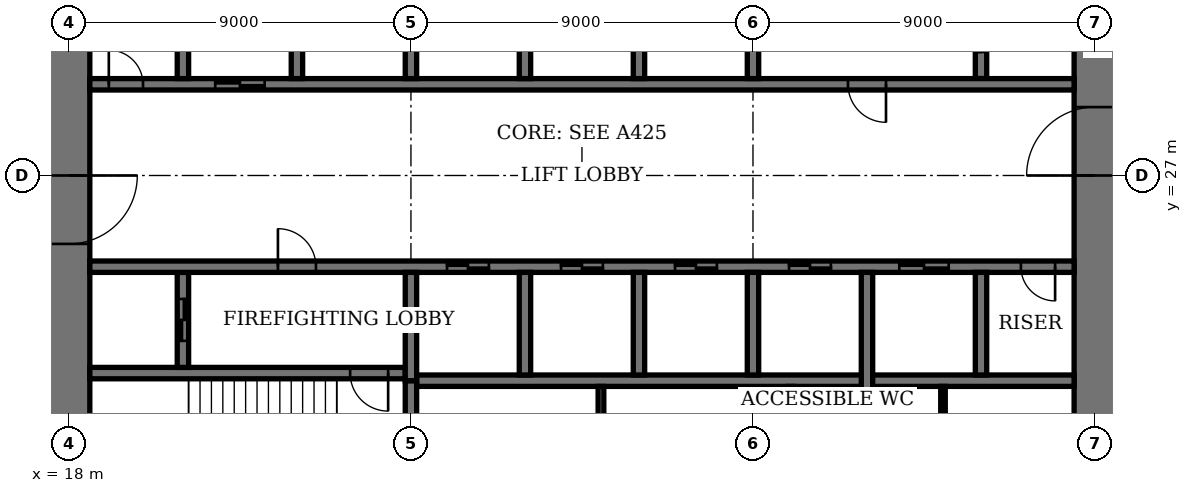
"""IFC4 building model, lengths in metres.
Left out: names, types, materials, properties, quantities, classifications, styles, units other than length and angle.
Written with IfcOpenShell. Run it as: python <this file> out.ifc"""

import sys

from ifc_helpers import new_model, si_unit, direction, frame, frame_2d, origin, place, context, subcontext, project, spatial, rectangle, extrude, element, fill, save


model = new_model("IFC4")
c1 = context("Model", 3, precision=1e-05, world=origin(), true_north=direction((0.0, 1.0)))
c2 = subcontext(c1, "Body", "Model", "MODEL_VIEW")
j1 = project(units=[si_unit("LENGTHUNIT", "METRE"), si_unit("PLANEANGLEUNIT", "RADIAN")], contexts=[c1])
p1 = place(None, origin())
s1 = spatial("IfcSite", under=j1, at=p1, CompositionType="ELEMENT")
p2 = place(p1, origin())
s2 = spatial("IfcBuilding", under=s1, at=p2, CompositionType="ELEMENT")
p3 = place(p2, frame((0.0, 0.0, 55.8)))
s3 = spatial("IfcBuildingStorey", under=s2, at=p3, CompositionType="ELEMENT", Elevation=55.8)
p4 = place(p3, frame((18.0, 35.45, 0.0), z_axis=(0.0, 0.0, 1.0), x_axis=(0.0, -1.0, 0.0)))
e1 = element("IfcWall", 1, at=p4, inside=s3, PredefinedType="SHEAR", context=c2, shape_type="SweptSolid", body=[
    extrude(rectangle(XDim=16.9, YDim=1.1, at=frame_2d((8.45, 0.0))), origin(), (0.0, 0.0, 1.0), 4.0),
])
p5 = place(p4, frame((8.45, 0.0, 0.0)))
e2 = element("IfcOpeningElement", 2, at=p5, cuts=e1, PredefinedType="OPENING", context=c2, shape_type="SweptSolid", body=[
    extrude(rectangle(XDim=1.8, YDim=2.4, at=frame_2d((0.9, 1.2))), frame((0.0, 0.56, 0.0), z_axis=(0.0, -1.0, 0.0), x_axis=(1.0, 0.0, 0.0)), (0.0, 0.0, 1.0), 1.12),
])
p6 = place(p3, frame((45.0, 18.55, 0.0), z_axis=(0.0, 0.0, 1.0), x_axis=(0.0, 1.0, 0.0)))
e3 = element("IfcWall", 3, at=p6, inside=s3, PredefinedType="SHEAR", context=c2, shape_type="SweptSolid", body=[
    extrude(rectangle(XDim=16.9, YDim=1.1, at=frame_2d((8.45, 0.0))), origin(), (0.0, 0.0, 1.0), 4.0),
])
p7 = place(p6, frame((8.45, 0.0, 0.0)))
e4 = element("IfcOpeningElement", 4, at=p7, cuts=e3, PredefinedType="OPENING", context=c2, shape_type="SweptSolid", body=[
    extrude(rectangle(XDim=1.8, YDim=2.4, at=frame_2d((0.9, 1.2))), frame((0.0, 0.56, 0.0), z_axis=(0.0, -1.0, 0.0), x_axis=(1.0, 0.0, 0.0)), (0.0, 0.0, 1.0), 1.12),
])
p8 = place(p3, frame((18.55, 21.8, 0.0), z_axis=(0.0, 0.0, 1.0), x_axis=(1.0, 0.0, 0.0)))
e5 = element("IfcWall", 5, at=p8, inside=s3, PredefinedType="SHEAR", context=c2, shape_type="SweptSolid", body=[
    extrude(rectangle(XDim=8.3, YDim=0.3, at=frame_2d((4.15, 0.0))), origin(), (0.0, 0.0, 1.0), 4.0),
])
p9 = place(p8, frame((6.85, 0.0, 0.0)))
e6 = element("IfcOpeningElement", 6, at=p9, cuts=e5, PredefinedType="OPENING", context=c2, shape_type="SweptSolid", body=[
    extrude(rectangle(XDim=1.0, YDim=2.4, at=frame_2d((0.5, 1.2))), frame((0.0, 0.16, 0.0), z_axis=(0.0, -1.0, 0.0), x_axis=(1.0, 0.0, 0.0)), (0.0, 0.0, 1.0), 0.32),
])
p10 = place(p3, frame((27.0, 18.55, 0.0), z_axis=(0.0, 0.0, 1.0), x_axis=(0.0, 1.0, 0.0)))
e7 = element("IfcWall", 7, at=p10, inside=s3, PredefinedType="SHEAR", context=c2, shape_type="SweptSolid", body=[
    extrude(rectangle(XDim=3.05, YDim=0.3, at=frame_2d((1.525, 0.0))), origin(), (0.0, 0.0, 1.0), 4.0),
])
p11 = place(p3, frame((21.0, 21.95, 0.0), z_axis=(0.0, 0.0, 1.0), x_axis=(0.0, 1.0, 0.0)))
e8 = element("IfcWall", 8, at=p11, inside=s3, PredefinedType="SHEAR", context=c2, shape_type="SweptSolid", body=[
    extrude(rectangle(XDim=2.5, YDim=0.3, at=frame_2d((1.25, 0.0))), origin(), (0.0, 0.0, 1.0), 4.0),
])
p12 = place(p11, frame((0.7, 0.0, 0.0)))
e9 = element("IfcOpeningElement", 9, at=p12, cuts=e8, PredefinedType="OPENING", context=c2, shape_type="SweptSolid", body=[
    extrude(rectangle(XDim=1.1, YDim=2.4, at=frame_2d((0.55, 1.2))), frame((0.0, 0.16, 0.0), z_axis=(0.0, -1.0, 0.0), x_axis=(1.0, 0.0, 0.0)), (0.0, 0.0, 1.0), 0.32),
])
p13 = place(p3, frame((42.0, 29.55, 0.0), z_axis=(0.0, 0.0, 1.0), x_axis=(0.0, 1.0, 0.0)))
e10 = element("IfcWall", 10, at=p13, inside=s3, PredefinedType="SHEAR", context=c2, shape_type="SweptSolid", body=[
    extrude(rectangle(XDim=2.5, YDim=0.3, at=frame_2d((1.25, 0.0))), origin(), (0.0, 0.0, 1.0), 4.0),
])
p14 = place(p13, frame((0.7, 0.0, 0.0)))
e11 = element("IfcOpeningElement", 11, at=p14, cuts=e10, PredefinedType="OPENING", context=c2, shape_type="SweptSolid", body=[
    extrude(rectangle(XDim=1.1, YDim=2.4, at=frame_2d((0.55, 1.2))), frame((0.0, 0.16, 0.0), z_axis=(0.0, -1.0, 0.0), x_axis=(1.0, 0.0, 0.0)), (0.0, 0.0, 1.0), 0.32),
])
p15 = place(p3, frame((18.55, 24.6, 0.0), z_axis=(0.0, 0.0, 1.0), x_axis=(1.0, 0.0, 0.0)))
e12 = element("IfcWall", 12, at=p15, inside=s3, PredefinedType="SHEAR", context=c2, shape_type="SweptSolid", body=[
    extrude(rectangle(XDim=25.9, YDim=0.3, at=frame_2d((12.95, 0.0))), origin(), (0.0, 0.0, 1.0), 4.0),
])
p16 = place(p15, frame((4.95, 0.0, 0.0)))
e13 = element("IfcOpeningElement", 13, at=p16, cuts=e12, PredefinedType="OPENING", context=c2, shape_type="SweptSolid", body=[
    extrude(rectangle(XDim=1.0, YDim=2.4, at=frame_2d((0.5, 1.2))), frame((0.0, 0.16, 0.0), z_axis=(0.0, -1.0, 0.0), x_axis=(1.0, 0.0, 0.0)), (0.0, 0.0, 1.0), 0.32),
])
p17 = place(p15, frame((24.5, 0.0, 0.0)))
e14 = element("IfcOpeningElement", 14, at=p17, cuts=e12, PredefinedType="OPENING", context=c2, shape_type="SweptSolid", body=[
    extrude(rectangle(XDim=0.9, YDim=2.1, at=frame_2d((0.45, 1.05))), frame((0.0, 0.16, 0.0), z_axis=(0.0, -1.0, 0.0), x_axis=(1.0, 0.0, 0.0)), (0.0, 0.0, 1.0), 0.32),
])
p18 = place(p15, frame((9.4, 0.0, 0.0)))
e15 = element("IfcOpeningElement", 15, at=p18, cuts=e12, PredefinedType="OPENING", context=c2, shape_type="SweptSolid", body=[
    extrude(rectangle(XDim=1.1, YDim=2.4, at=frame_2d((0.55, 1.2))), frame((0.0, 0.16, 0.0), z_axis=(0.0, -1.0, 0.0), x_axis=(1.0, 0.0, 0.0)), (0.0, 0.0, 1.0), 0.32),
])
p19 = place(p15, frame((12.4, 0.0, 0.0)))
e16 = element("IfcOpeningElement", 16, at=p19, cuts=e12, PredefinedType="OPENING", context=c2, shape_type="SweptSolid", body=[
    extrude(rectangle(XDim=1.1, YDim=2.4, at=frame_2d((0.55, 1.2))), frame((0.0, 0.16, 0.0), z_axis=(0.0, -1.0, 0.0), x_axis=(1.0, 0.0, 0.0)), (0.0, 0.0, 1.0), 0.32),
])
p20 = place(p15, frame((15.4, 0.0, 0.0)))
e17 = element("IfcOpeningElement", 17, at=p20, cuts=e12, PredefinedType="OPENING", context=c2, shape_type="SweptSolid", body=[
    extrude(rectangle(XDim=1.1, YDim=2.4, at=frame_2d((0.55, 1.2))), frame((0.0, 0.16, 0.0), z_axis=(0.0, -1.0, 0.0), x_axis=(1.0, 0.0, 0.0)), (0.0, 0.0, 1.0), 0.32),
])
p21 = place(p15, frame((18.4, 0.0, 0.0)))
e18 = element("IfcOpeningElement", 18, at=p21, cuts=e12, PredefinedType="OPENING", context=c2, shape_type="SweptSolid", body=[
    extrude(rectangle(XDim=1.1, YDim=2.4, at=frame_2d((0.55, 1.2))), frame((0.0, 0.16, 0.0), z_axis=(0.0, -1.0, 0.0), x_axis=(1.0, 0.0, 0.0)), (0.0, 0.0, 1.0), 0.32),
])
p22 = place(p15, frame((21.3, 0.0, 0.0)))
e19 = element("IfcOpeningElement", 19, at=p22, cuts=e12, PredefinedType="OPENING", context=c2, shape_type="SweptSolid", body=[
    extrude(rectangle(XDim=1.3, YDim=2.4, at=frame_2d((0.65, 1.2))), frame((0.0, 0.16, 0.0), z_axis=(0.0, -1.0, 0.0), x_axis=(1.0, 0.0, 0.0)), (0.0, 0.0, 1.0), 0.32),
])
p23 = place(p3, frame((18.55, 29.4, 0.0), z_axis=(0.0, 0.0, 1.0), x_axis=(1.0, 0.0, 0.0)))
e20 = element("IfcWall", 20, at=p23, inside=s3, PredefinedType="SHEAR", context=c2, shape_type="SweptSolid", body=[
    extrude(rectangle(XDim=25.9, YDim=0.3, at=frame_2d((12.95, 0.0))), origin(), (0.0, 0.0, 1.0), 4.0),
])
p24 = place(p23, frame((19.95, 0.0, 0.0)))
e21 = element("IfcOpeningElement", 21, at=p24, cuts=e20, PredefinedType="OPENING", context=c2, shape_type="SweptSolid", body=[
    extrude(rectangle(XDim=1.0, YDim=2.4, at=frame_2d((0.5, 1.2))), frame((0.0, 0.16, 0.0), z_axis=(0.0, -1.0, 0.0), x_axis=(1.0, 0.0, 0.0)), (0.0, 0.0, 1.0), 0.32),
])
p25 = place(p23, frame((0.5, 0.0, 0.0)))
e22 = element("IfcOpeningElement", 22, at=p25, cuts=e20, PredefinedType="OPENING", context=c2, shape_type="SweptSolid", body=[
    extrude(rectangle(XDim=0.9, YDim=2.1, at=frame_2d((0.45, 1.05))), frame((0.0, 0.16, 0.0), z_axis=(0.0, -1.0, 0.0), x_axis=(1.0, 0.0, 0.0)), (0.0, 0.0, 1.0), 0.32),
])
p26 = place(p23, frame((3.3, 0.0, 0.0)))
e23 = element("IfcOpeningElement", 23, at=p26, cuts=e20, PredefinedType="OPENING", context=c2, shape_type="SweptSolid", body=[
    extrude(rectangle(XDim=1.3, YDim=2.4, at=frame_2d((0.65, 1.2))), frame((0.0, 0.16, 0.0), z_axis=(0.0, -1.0, 0.0), x_axis=(1.0, 0.0, 0.0)), (0.0, 0.0, 1.0), 0.32),
])
p27 = place(p3, frame((27.15, 21.6, 0.0), z_axis=(0.0, 0.0, 1.0), x_axis=(1.0, 0.0, 0.0)))
e24 = element("IfcWall", 24, at=p27, inside=s3, PredefinedType="SHEAR", context=c2, shape_type="SweptSolid", body=[
    extrude(rectangle(XDim=17.3, YDim=0.3, at=frame_2d((8.65, 0.0))), origin(), (0.0, 0.0, 1.0), 4.0),
])
for number, where, z_axis, x_axis in (
    (25, (30.0, 21.75, 0.0), (0.0, 0.0, 1.0), (0.0, 1.0, 0.0)),
    (26, (33.0, 29.55, 0.0), (0.0, 0.0, 1.0), (0.0, 1.0, 0.0)),
    (27, (33.0, 21.75, 0.0), (0.0, 0.0, 1.0), (0.0, 1.0, 0.0)),
    (28, (30.0, 29.55, 0.0), (0.0, 0.0, 1.0), (0.0, 1.0, 0.0)),
    (29, (36.0, 21.75, 0.0), (0.0, 0.0, 1.0), (0.0, 1.0, 0.0)),
    (30, (27.0, 29.55, 0.0), (0.0, 0.0, 1.0), (0.0, 1.0, 0.0)),
):
    element("IfcWall", number, at=place(p3, frame(where, z_axis=z_axis, x_axis=x_axis)), inside=s3, PredefinedType="SHEAR", context=c2, shape_type="SweptSolid", body=[
        extrude(rectangle(XDim=2.7, YDim=0.3, at=frame_2d((1.35, 0.0))), origin(), (0.0, 0.0, 1.0), 4.0),
    ])
for number, where, z_axis, x_axis in (
    (31, (39.0, 18.55, 0.0), (0.0, 0.0, 1.0), (0.0, 1.0, 0.0)),
    (32, (24.0, 29.55, 0.0), (0.0, 0.0, 1.0), (0.0, 1.0, 0.0)),
):
    element("IfcWall", number, at=place(p3, frame(where, z_axis=z_axis, x_axis=x_axis)), inside=s3, PredefinedType="SHEAR", context=c2, shape_type="SweptSolid", body=[
        extrude(rectangle(XDim=5.9, YDim=0.3, at=frame_2d((2.95, 0.0))), origin(), (0.0, 0.0, 1.0), 4.0),
    ])
for number, where, z_axis, x_axis in (
    (33, (42.0, 21.75, 0.0), (0.0, 0.0, 1.0), (0.0, 1.0, 0.0)),
    (34, (21.0, 29.55, 0.0), (0.0, 0.0, 1.0), (0.0, 1.0, 0.0)),
):
    element("IfcWall", number, at=place(p3, frame(where, z_axis=z_axis, x_axis=x_axis)), inside=s3, PredefinedType="SHEAR", context=c2, shape_type="SweptSolid", body=[
        extrude(rectangle(XDim=2.7, YDim=0.3, at=frame_2d((1.35, 0.0))), origin(), (0.0, 0.0, 1.0), 4.0),
    ])
for number, where, z_axis, x_axis in (
    (35, (27.0, 21.6, 0.0), (0.0, 0.0, 1.0), (0.0, 1.0, 0.0)),
    (36, (36.0, 29.55, 0.0), (0.0, 0.0, 1.0), (0.0, 1.0, 0.0)),
):
    element("IfcWall", number, at=place(p3, frame(where, z_axis=z_axis, x_axis=x_axis)), inside=s3, PredefinedType="SHEAR", context=c2, shape_type="SweptSolid", body=[
        extrude(rectangle(XDim=2.85, YDim=0.3, at=frame_2d((1.425, 0.0))), origin(), (0.0, 0.0, 1.0), 4.0),
    ])
for number, where, z_axis, x_axis in (
    (37, (32.0, 18.55, 0.0), (0.0, 0.0, 1.0), (0.0, 1.0, 0.0)),
    (38, (37.0, 18.55, 0.0), (0.0, 0.0, 1.0), (0.0, 1.0, 0.0)),
):
    element("IfcWall", number, at=place(p3, frame(where, z_axis=z_axis, x_axis=x_axis)), inside=s3, PredefinedType="PARTITIONING", context=c2, shape_type="SweptSolid", body=[
        extrude(rectangle(XDim=2.9, YDim=0.15, at=frame_2d((1.45, 0.0))), origin(), (0.0, 0.0, 1.0), 3.75),
    ])
p28 = place(p3, frame((41.0, 18.55, 0.0), z_axis=(0.0, 0.0, 1.0), x_axis=(0.0, 1.0, 0.0)))
e39 = element("IfcWall", 39, at=p28, inside=s3, PredefinedType="PARTITIONING", context=c2, shape_type="SweptSolid", body=[
    extrude(rectangle(XDim=2.9, YDim=0.12, at=frame_2d((1.45, 0.0))), origin(), (0.0, 0.0, 1.0), 3.75),
])
p29 = place(p28, frame((0.95, 0.0, 0.0)))
e40 = element("IfcOpeningElement", 40, at=p29, cuts=e39, PredefinedType="OPENING", context=c2, shape_type="SweptSolid", body=[
    extrude(rectangle(XDim=1.0, YDim=2.4, at=frame_2d((0.5, 1.2))), frame((0.0, 0.07, 0.0), z_axis=(0.0, -1.0, 0.0), x_axis=(1.0, 0.0, 0.0)), (0.0, 0.0, 1.0), 0.14),
])
p30 = place(p5, origin())
e41 = element("IfcDoor", 41, at=p30, inside=s3, OperationType="DOUBLE_DOOR_DOUBLE_SWING", PredefinedType="DOOR", context=c2, shape_type="SweptSolid", body=[
    extrude(rectangle(XDim=1.8, YDim=2.4, at=frame_2d((0.9, 1.2))), frame((0.0, 0.03, 0.0), z_axis=(0.0, -1.0, 0.0), x_axis=(1.0, 0.0, 0.0)), (0.0, 0.0, 1.0), 0.06),
    extrude(rectangle(XDim=0.04, YDim=2.4, at=frame_2d((0.02, 1.2))), frame((0.0, 0.55, 0.0), z_axis=(0.0, -1.0, 0.0), x_axis=(1.0, 0.0, 0.0)), (0.0, 0.0, 1.0), 1.1),
    extrude(rectangle(XDim=0.04, YDim=2.4, at=frame_2d((1.78, 1.2))), frame((0.0, 0.55, 0.0), z_axis=(0.0, -1.0, 0.0), x_axis=(1.0, 0.0, 0.0)), (0.0, 0.0, 1.0), 1.1),
    extrude(rectangle(XDim=1.8, YDim=0.04, at=frame_2d((0.9, 2.38))), frame((0.0, 0.55, 0.0), z_axis=(0.0, -1.0, 0.0), x_axis=(1.0, 0.0, 0.0)), (0.0, 0.0, 1.0), 1.1),
])
fill(e2, e41)
p31 = place(p7, origin())
e42 = element("IfcDoor", 42, at=p31, inside=s3, OperationType="DOUBLE_DOOR_DOUBLE_SWING", PredefinedType="DOOR", context=c2, shape_type="SweptSolid", body=[
    extrude(rectangle(XDim=1.8, YDim=2.4, at=frame_2d((0.9, 1.2))), frame((0.0, 0.03, 0.0), z_axis=(0.0, -1.0, 0.0), x_axis=(1.0, 0.0, 0.0)), (0.0, 0.0, 1.0), 0.06),
    extrude(rectangle(XDim=0.04, YDim=2.4, at=frame_2d((0.02, 1.2))), frame((0.0, 0.55, 0.0), z_axis=(0.0, -1.0, 0.0), x_axis=(1.0, 0.0, 0.0)), (0.0, 0.0, 1.0), 1.1),
    extrude(rectangle(XDim=0.04, YDim=2.4, at=frame_2d((1.78, 1.2))), frame((0.0, 0.55, 0.0), z_axis=(0.0, -1.0, 0.0), x_axis=(1.0, 0.0, 0.0)), (0.0, 0.0, 1.0), 1.1),
    extrude(rectangle(XDim=1.8, YDim=0.04, at=frame_2d((0.9, 2.38))), frame((0.0, 0.55, 0.0), z_axis=(0.0, -1.0, 0.0), x_axis=(1.0, 0.0, 0.0)), (0.0, 0.0, 1.0), 1.1),
])
fill(e4, e42)
p32 = place(p9, origin())
e43 = element("IfcDoor", 43, at=p32, inside=s3, OperationType="SINGLE_SWING_RIGHT", PredefinedType="DOOR", context=c2, shape_type="SweptSolid", body=[
    extrude(rectangle(XDim=1.0, YDim=2.4, at=frame_2d((0.5, 1.2))), frame((0.0, 0.03, 0.0), z_axis=(0.0, -1.0, 0.0), x_axis=(1.0, 0.0, 0.0)), (0.0, 0.0, 1.0), 0.06),
])
fill(e6, e43)
p33 = place(p16, origin())
e44 = element("IfcDoor", 44, at=p33, inside=s3, OperationType="SINGLE_SWING_RIGHT", PredefinedType="DOOR", context=c2, shape_type="SweptSolid", body=[
    extrude(rectangle(XDim=1.0, YDim=2.4, at=frame_2d((0.5, 1.2))), frame((0.0, 0.03, 0.0), z_axis=(0.0, -1.0, 0.0), x_axis=(1.0, 0.0, 0.0)), (0.0, 0.0, 1.0), 0.06),
])
fill(e13, e44)
p34 = place(p24, origin())
e45 = element("IfcDoor", 45, at=p34, inside=s3, OperationType="SINGLE_SWING_RIGHT", PredefinedType="DOOR", context=c2, shape_type="SweptSolid", body=[
    extrude(rectangle(XDim=1.0, YDim=2.4, at=frame_2d((0.5, 1.2))), frame((0.0, 0.03, 0.0), z_axis=(0.0, -1.0, 0.0), x_axis=(1.0, 0.0, 0.0)), (0.0, 0.0, 1.0), 0.06),
])
fill(e21, e45)
p35 = place(p17, origin())
e46 = element("IfcDoor", 46, at=p35, inside=s3, OperationType="SINGLE_SWING_RIGHT", PredefinedType="DOOR", context=c2, shape_type="SweptSolid", body=[
    extrude(rectangle(XDim=0.9, YDim=2.1, at=frame_2d((0.45, 1.05))), frame((0.0, 0.03, 0.0), z_axis=(0.0, -1.0, 0.0), x_axis=(1.0, 0.0, 0.0)), (0.0, 0.0, 1.0), 0.06),
])
fill(e14, e46)
p36 = place(p25, origin())
e47 = element("IfcDoor", 47, at=p36, inside=s3, OperationType="SINGLE_SWING_RIGHT", PredefinedType="DOOR", context=c2, shape_type="SweptSolid", body=[
    extrude(rectangle(XDim=0.9, YDim=2.1, at=frame_2d((0.45, 1.05))), frame((0.0, 0.03, 0.0), z_axis=(0.0, -1.0, 0.0), x_axis=(1.0, 0.0, 0.0)), (0.0, 0.0, 1.0), 0.06),
])
fill(e22, e47)
p37 = place(p18, origin())
e48 = element("IfcDoor", 48, at=p37, inside=s3, OperationType="DOUBLE_DOOR_SLIDING", PredefinedType="DOOR", context=c2, shape_type="SweptSolid", body=[
    extrude(rectangle(XDim=1.1, YDim=2.4, at=frame_2d((0.55, 1.2))), frame((0.0, 0.02, 0.0), z_axis=(0.0, -1.0, 0.0), x_axis=(1.0, 0.0, 0.0)), (0.0, 0.0, 1.0), 0.04),
])
fill(e15, e48)
p38 = place(p19, origin())
e49 = element("IfcDoor", 49, at=p38, inside=s3, OperationType="DOUBLE_DOOR_SLIDING", PredefinedType="DOOR", context=c2, shape_type="SweptSolid", body=[
    extrude(rectangle(XDim=1.1, YDim=2.4, at=frame_2d((0.55, 1.2))), frame((0.0, 0.02, 0.0), z_axis=(0.0, -1.0, 0.0), x_axis=(1.0, 0.0, 0.0)), (0.0, 0.0, 1.0), 0.04),
])
fill(e16, e49)
p39 = place(p20, origin())
e50 = element("IfcDoor", 50, at=p39, inside=s3, OperationType="DOUBLE_DOOR_SLIDING", PredefinedType="DOOR", context=c2, shape_type="SweptSolid", body=[
    extrude(rectangle(XDim=1.1, YDim=2.4, at=frame_2d((0.55, 1.2))), frame((0.0, 0.02, 0.0), z_axis=(0.0, -1.0, 0.0), x_axis=(1.0, 0.0, 0.0)), (0.0, 0.0, 1.0), 0.04),
])
fill(e17, e50)
p40 = place(p21, origin())
e51 = element("IfcDoor", 51, at=p40, inside=s3, OperationType="DOUBLE_DOOR_SLIDING", PredefinedType="DOOR", context=c2, shape_type="SweptSolid", body=[
    extrude(rectangle(XDim=1.1, YDim=2.4, at=frame_2d((0.55, 1.2))), frame((0.0, 0.02, 0.0), z_axis=(0.0, -1.0, 0.0), x_axis=(1.0, 0.0, 0.0)), (0.0, 0.0, 1.0), 0.04),
])
fill(e18, e51)
p41 = place(p22, origin())
e52 = element("IfcDoor", 52, at=p41, inside=s3, OperationType="DOUBLE_DOOR_SLIDING", PredefinedType="DOOR", context=c2, shape_type="SweptSolid", body=[
    extrude(rectangle(XDim=1.3, YDim=2.4, at=frame_2d((0.65, 1.2))), frame((0.0, 0.02, 0.0), z_axis=(0.0, -1.0, 0.0), x_axis=(1.0, 0.0, 0.0)), (0.0, 0.0, 1.0), 0.04),
])
fill(e19, e52)
p42 = place(p26, origin())
e53 = element("IfcDoor", 53, at=p42, inside=s3, OperationType="DOUBLE_DOOR_SLIDING", PredefinedType="DOOR", context=c2, shape_type="SweptSolid", body=[
    extrude(rectangle(XDim=1.3, YDim=2.4, at=frame_2d((0.65, 1.2))), frame((0.0, 0.02, 0.0), z_axis=(0.0, -1.0, 0.0), x_axis=(1.0, 0.0, 0.0)), (0.0, 0.0, 1.0), 0.04),
])
fill(e23, e53)
p43 = place(p12, origin())
e54 = element("IfcDoor", 54, at=p43, inside=s3, OperationType="DOUBLE_DOOR_SLIDING", PredefinedType="DOOR", context=c2, shape_type="SweptSolid", body=[
    extrude(rectangle(XDim=1.1, YDim=2.4, at=frame_2d((0.55, 1.2))), frame((0.0, 0.03, 0.0), z_axis=(0.0, -1.0, 0.0), x_axis=(1.0, 0.0, 0.0)), (0.0, 0.0, 1.0), 0.06),
])
fill(e9, e54)
save(model, sys.argv[1])
